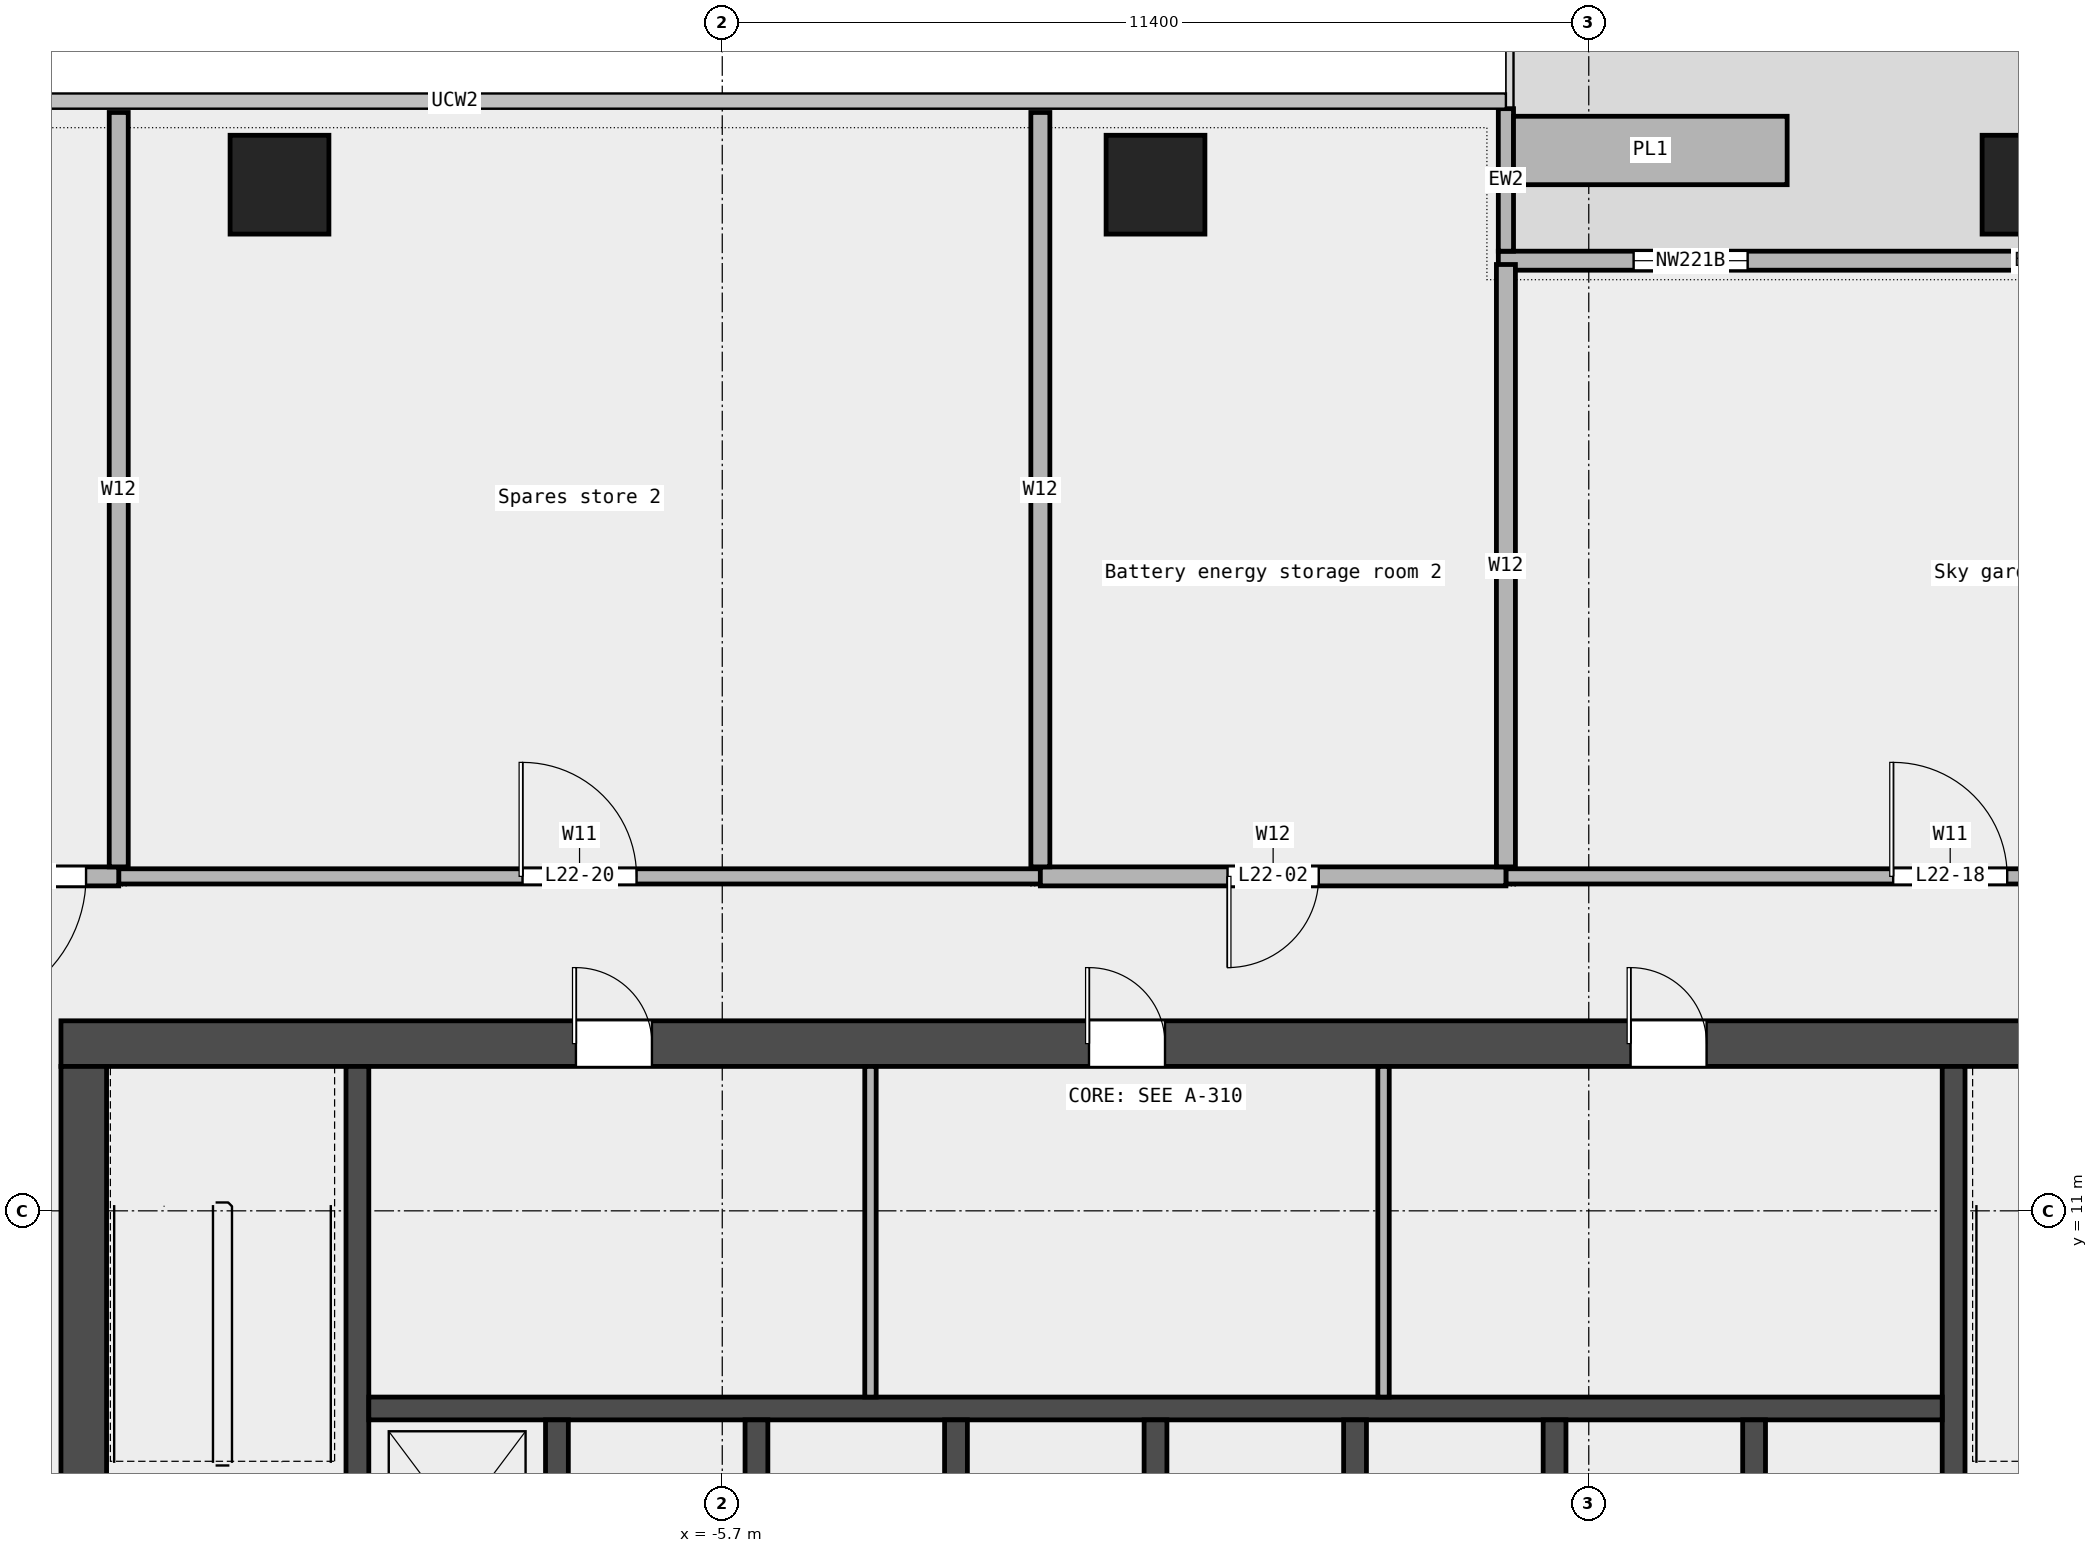
"""IFC4 building model, lengths in metres.
Left out: names, types, materials, properties, quantities, classifications, styles, units other than length and angle.
Written with IfcOpenShell. Run it as: python <this file> out.ifc"""

import sys

from ifc_helpers import new_model, si_unit, direction, frame, frame_2d, origin, origin_2d, place, context, subcontext, project, spatial, rectangle, extrude, element, fill, save


model = new_model("IFC4")
c1 = context("Model", 3, precision=1e-05, world=origin(), true_north=direction((0.0, 1.0)))
c2 = subcontext(c1, "Body", "Model", "MODEL_VIEW")
j1 = project(units=[si_unit("LENGTHUNIT", "METRE"), si_unit("PLANEANGLEUNIT", "RADIAN")], contexts=[c1])
p1 = place(None, origin())
s1 = spatial("IfcSite", under=j1, at=p1, CompositionType="ELEMENT")
p2 = place(p1, origin())
s2 = spatial("IfcBuilding", under=s1, at=p2, CompositionType="ELEMENT")
p3 = place(p2, frame((0.0, 0.0, 112.6)))
s3 = spatial("IfcBuildingStorey", under=s2, at=p3, CompositionType="ELEMENT", Elevation=112.6)
for number, where, z_axis, x_axis in (
    (1, (11.525, 24.5, 0.0), (0.0, 0.0, 1.0), (1.0, 0.0, 0.0)),
    (2, (0.0, 24.5, 0.0), (0.0, 0.0, 1.0), (1.0, 0.0, 0.0)),
    (3, (-11.525, 24.5, 0.0), (0.0, 0.0, 1.0), (1.0, 0.0, 0.0)),
):
    element("IfcColumn", number, at=place(p3, frame(where, z_axis=z_axis, x_axis=x_axis)), inside=s3, PredefinedType="COLUMN", context=c2, shape_type="SweptSolid", body=[
        extrude(rectangle(XDim=1.3, YDim=1.3, at=origin_2d()), origin(), (0.0, 0.0, 1.0), 4.05),
    ])
p4 = place(p3, frame((18.54, 23.5, 0.0), z_axis=(0.0, 0.0, 1.0), x_axis=(-1.0, 0.0, 0.0)))
e4 = element("IfcWall", 4, at=p4, inside=s3, PredefinedType="STANDARD", context=c2, shape_type="SweptSolid", body=[
    extrude(rectangle(XDim=14.03, YDim=0.25, at=frame_2d((7.015, 0.0))), origin(), (0.0, 0.0, 1.0), 4.05),
])
p5 = place(p4, frame((1.75, 0.0, 0.45)))
e5 = element("IfcOpeningElement", 5, at=p5, cuts=e4, PredefinedType="OPENING", context=c2, shape_type="SweptSolid", body=[
    extrude(rectangle(XDim=1.5, YDim=3.0, at=frame_2d((0.75, 1.5))), frame((0.0, 0.137, 0.0), z_axis=(0.0, -1.0, 0.0), x_axis=(1.0, 0.0, 0.0)), (0.0, 0.0, 1.0), 0.274),
])
p6 = place(p4, frame((4.25, 0.0, 0.0)))
e6 = element("IfcOpeningElement", 6, at=p6, cuts=e4, PredefinedType="OPENING", context=c2, shape_type="SweptSolid", body=[
    extrude(rectangle(XDim=1.8, YDim=2.4, at=frame_2d((0.9, 1.2))), frame((0.0, 0.137, 0.0), z_axis=(0.0, -1.0, 0.0), x_axis=(1.0, 0.0, 0.0)), (0.0, 0.0, 1.0), 0.274),
])
p7 = place(p4, frame((10.75, 0.0, 0.45)))
e7 = element("IfcOpeningElement", 7, at=p7, cuts=e4, PredefinedType="OPENING", context=c2, shape_type="SweptSolid", body=[
    extrude(rectangle(XDim=1.5, YDim=3.0, at=frame_2d((0.75, 1.5))), frame((0.0, 0.137, 0.0), z_axis=(0.0, -1.0, 0.0), x_axis=(1.0, 0.0, 0.0)), (0.0, 0.0, 1.0), 0.274),
])
p8 = place(p3, frame((4.61, 25.5, 0.0), z_axis=(0.0, 0.0, 1.0), x_axis=(0.0, -1.0, 0.0)))
e8 = element("IfcWall", 8, at=p8, inside=s3, PredefinedType="STANDARD", context=c2, shape_type="SweptSolid", body=[
    extrude(rectangle(XDim=1.875, YDim=0.2, at=frame_2d((0.938, 0.0))), origin(), (0.0, 0.0, 1.0), 4.05),
])
p9 = place(p3, frame((8.31, 24.95, 0.0), z_axis=(0.0, 0.0, 1.0), x_axis=(-1.0, 0.0, 0.0)))
e9 = element("IfcWall", 9, at=p9, inside=s3, PredefinedType="STANDARD", context=c2, shape_type="SweptSolid", body=[
    extrude(rectangle(XDim=3.6, YDim=0.9, at=frame_2d((1.8, 0.0))), origin(), (0.0, 0.0, 1.0), 0.7),
])
p10 = place(p3, frame((-13.64, 15.4, 0.0), z_axis=(0.0, 0.0, 1.0), x_axis=(1.0, 0.0, 0.0)))
e10 = element("IfcWall", 10, at=p10, inside=s3, PredefinedType="PARTITIONING", context=c2, shape_type="SweptSolid", body=[
    extrude(rectangle(XDim=12.125, YDim=0.2, at=frame_2d((6.062, 0.0))), origin(), (0.0, 0.0, 1.0), 4.05),
])
p11 = place(p10, frame((5.312, 0.0, 0.0)))
e11 = element("IfcOpeningElement", 11, at=p11, cuts=e10, PredefinedType="OPENING", context=c2, shape_type="SweptSolid", body=[
    extrude(rectangle(XDim=1.5, YDim=2.1, at=frame_2d((0.75, 1.05))), frame((0.0, 0.112, 0.0), z_axis=(0.0, -1.0, 0.0), x_axis=(1.0, 0.0, 0.0)), (0.0, 0.0, 1.0), 0.224),
])
p12 = place(p3, frame((4.61, 15.4, 0.0), z_axis=(0.0, 0.0, 1.0), x_axis=(1.0, 0.0, 0.0)))
e12 = element("IfcWall", 12, at=p12, inside=s3, PredefinedType="PARTITIONING", context=c2, shape_type="SweptSolid", body=[
    extrude(rectangle(XDim=11.69, YDim=0.2, at=frame_2d((5.845, 0.0))), origin(), (0.0, 0.0, 1.0), 4.05),
])
p13 = place(p12, frame((5.095, 0.0, 0.0)))
e13 = element("IfcOpeningElement", 13, at=p13, cuts=e12, PredefinedType="OPENING", context=c2, shape_type="SweptSolid", body=[
    extrude(rectangle(XDim=1.5, YDim=2.1, at=frame_2d((0.75, 1.05))), frame((0.0, 0.112, 0.0), z_axis=(0.0, -1.0, 0.0), x_axis=(1.0, 0.0, 0.0)), (0.0, 0.0, 1.0), 0.224),
])
p14 = place(p3, frame((-21.7, 15.4, 0.0), z_axis=(0.0, 0.0, 1.0), x_axis=(1.0, 0.0, 0.0)))
e14 = element("IfcWall", 14, at=p14, inside=s3, PredefinedType="PARTITIONING", context=c2, shape_type="SweptSolid", body=[
    extrude(rectangle(XDim=8.06, YDim=0.25, at=frame_2d((4.03, 0.0))), origin(), (0.0, 0.0, 1.0), 4.05),
])
p15 = place(p14, frame((5.83, 0.0, 0.0)))
e15 = element("IfcOpeningElement", 15, at=p15, cuts=e14, PredefinedType="OPENING", context=c2, shape_type="SweptSolid", body=[
    extrude(rectangle(XDim=1.8, YDim=2.1, at=frame_2d((0.9, 1.05))), frame((0.0, 0.137, 0.0), z_axis=(0.0, -1.0, 0.0), x_axis=(1.0, 0.0, 0.0)), (0.0, 0.0, 1.0), 0.274),
])
p16 = place(p3, frame((-1.515, 15.4, 0.0), z_axis=(0.0, 0.0, 1.0), x_axis=(1.0, 0.0, 0.0)))
e16 = element("IfcWall", 16, at=p16, inside=s3, PredefinedType="PARTITIONING", context=c2, shape_type="SweptSolid", body=[
    extrude(rectangle(XDim=6.125, YDim=0.25, at=frame_2d((3.062, 0.0))), origin(), (0.0, 0.0, 1.0), 4.05),
])
p17 = place(p16, frame((2.462, 0.0, 0.0)))
e17 = element("IfcOpeningElement", 17, at=p17, cuts=e16, PredefinedType="OPENING", context=c2, shape_type="SweptSolid", body=[
    extrude(rectangle(XDim=1.2, YDim=2.1, at=frame_2d((0.6, 1.05))), frame((0.0, 0.137, 0.0), z_axis=(0.0, -1.0, 0.0), x_axis=(1.0, 0.0, 0.0)), (0.0, 0.0, 1.0), 0.274),
])
for number, where, z_axis, x_axis in (
    (18, (-13.64, 15.525, 0.0), (0.0, 0.0, 1.0), (0.0, 1.0, 0.0)),
    (19, (-1.515, 15.525, 0.0), (0.0, 0.0, 1.0), (0.0, 1.0, 0.0)),
):
    element("IfcWall", number, at=place(p3, frame(where, z_axis=z_axis, x_axis=x_axis)), inside=s3, PredefinedType="PARTITIONING", context=c2, shape_type="SweptSolid", body=[
        extrude(rectangle(XDim=9.925, YDim=0.25, at=frame_2d((4.962, 0.0))), origin(), (0.0, 0.0, 1.0), 4.05),
    ])
p18 = place(p3, frame((4.61, 15.525, 0.0), z_axis=(0.0, 0.0, 1.0), x_axis=(0.0, 1.0, 0.0)))
e20 = element("IfcWall", 20, at=p18, inside=s3, PredefinedType="PARTITIONING", context=c2, shape_type="SweptSolid", body=[
    extrude(rectangle(XDim=7.925, YDim=0.25, at=frame_2d((3.962, 0.0))), origin(), (0.0, 0.0, 1.0), 4.05),
])
p19 = place(p3, frame((-14.4, 13.2, 0.0), z_axis=(0.0, 0.0, 1.0), x_axis=(1.0, 0.0, 0.0)))
e21 = element("IfcWall", 21, at=p19, inside=s3, PredefinedType="SHEAR", context=c2, shape_type="SweptSolid", body=[
    extrude(rectangle(XDim=28.8, YDim=0.6, at=frame_2d((14.4, 0.0))), origin(), (0.0, 0.0, 1.0), 4.2),
])
p20 = place(p19, frame((6.775, 0.0, 0.0)))
e22 = element("IfcOpeningElement", 22, at=p20, cuts=e21, PredefinedType="OPENING", context=c2, shape_type="SweptSolid", body=[
    extrude(rectangle(XDim=1.0, YDim=2.1, at=frame_2d((0.5, 1.05))), frame((0.0, 0.312, 0.0), z_axis=(0.0, -1.0, 0.0), x_axis=(1.0, 0.0, 0.0)), (0.0, 0.0, 1.0), 0.624),
])
p21 = place(p19, frame((13.525, 0.0, 0.0)))
e23 = element("IfcOpeningElement", 23, at=p21, cuts=e21, PredefinedType="OPENING", context=c2, shape_type="SweptSolid", body=[
    extrude(rectangle(XDim=1.0, YDim=2.1, at=frame_2d((0.5, 1.05))), frame((0.0, 0.312, 0.0), z_axis=(0.0, -1.0, 0.0), x_axis=(1.0, 0.0, 0.0)), (0.0, 0.0, 1.0), 0.624),
])
p22 = place(p19, frame((20.65, 0.0, 0.0)))
e24 = element("IfcOpeningElement", 24, at=p22, cuts=e21, PredefinedType="OPENING", context=c2, shape_type="SweptSolid", body=[
    extrude(rectangle(XDim=1.0, YDim=2.1, at=frame_2d((0.5, 1.05))), frame((0.0, 0.312, 0.0), z_axis=(0.0, -1.0, 0.0), x_axis=(1.0, 0.0, 0.0)), (0.0, 0.0, 1.0), 0.624),
])
p23 = place(p3, frame((-14.1, -6.6, 0.0), z_axis=(0.0, 0.0, 1.0), x_axis=(0.0, 1.0, 0.0)))
e25 = element("IfcWall", 25, at=p23, inside=s3, PredefinedType="SHEAR", context=c2, shape_type="SweptSolid", body=[
    extrude(rectangle(XDim=19.5, YDim=0.6, at=frame_2d((9.75, 0.0))), origin(), (0.0, 0.0, 1.0), 4.2),
])
p24 = place(p23, frame((9.3, 0.0, 0.0)))
e26 = element("IfcOpeningElement", 26, at=p24, cuts=e25, PredefinedType="OPENING", context=c2, shape_type="SweptSolid", body=[
    extrude(rectangle(XDim=1.8, YDim=2.1, at=frame_2d((0.9, 1.05))), frame((0.0, 0.312, 0.0), z_axis=(0.0, -1.0, 0.0), x_axis=(1.0, 0.0, 0.0)), (0.0, 0.0, 1.0), 0.624),
])
for number, where, z_axis, x_axis in (
    (27, (-10.5, 5.25, 0.0), (0.0, 0.0, 1.0), (0.0, 1.0, 0.0)),
    (28, (10.5, 5.25, 0.0), (0.0, 0.0, 1.0), (0.0, 1.0, 0.0)),
):
    element("IfcWall", number, at=place(p3, frame(where, z_axis=z_axis, x_axis=x_axis)), inside=s3, PredefinedType="SHEAR", context=c2, shape_type="SweptSolid", body=[
        extrude(rectangle(XDim=7.65, YDim=0.3, at=frame_2d((3.825, 0.0))), origin(), (0.0, 0.0, 1.0), 4.2),
    ])
p25 = place(p3, frame((-10.35, 8.4, 0.0), z_axis=(0.0, 0.0, 1.0), x_axis=(1.0, 0.0, 0.0)))
e29 = element("IfcWall", 29, at=p25, inside=s3, PredefinedType="SOLIDWALL", context=c2, shape_type="SweptSolid", body=[
    extrude(rectangle(XDim=20.7, YDim=0.3, at=frame_2d((10.35, 0.0))), origin(), (0.0, 0.0, 1.0), 4.2),
])
for number, where, z_axis, x_axis in (
    (30, (-7.875, 5.55, 0.0), (0.0, 0.0, 1.0), (0.0, 1.0, 0.0)),
    (31, (-5.25, 5.55, 0.0), (0.0, 0.0, 1.0), (0.0, 1.0, 0.0)),
    (32, (-2.625, 5.55, 0.0), (0.0, 0.0, 1.0), (0.0, 1.0, 0.0)),
    (33, (0.0, 5.55, 0.0), (0.0, 0.0, 1.0), (0.0, 1.0, 0.0)),
    (34, (2.625, 5.55, 0.0), (0.0, 0.0, 1.0), (0.0, 1.0, 0.0)),
    (35, (5.25, 5.55, 0.0), (0.0, 0.0, 1.0), (0.0, 1.0, 0.0)),
    (36, (7.875, 5.55, 0.0), (0.0, 0.0, 1.0), (0.0, 1.0, 0.0)),
):
    element("IfcWall", number, at=place(p3, frame(where, z_axis=z_axis, x_axis=x_axis)), inside=s3, PredefinedType="SOLIDWALL", context=c2, shape_type="SweptSolid", body=[
        extrude(rectangle(XDim=2.7, YDim=0.3, at=frame_2d((1.35, 0.0))), origin(), (0.0, 0.0, 1.0), 4.2),
    ])
for number, where, z_axis, x_axis in (
    (37, (-3.75, 8.55, 0.0), (0.0, 0.0, 1.0), (0.0, 1.0, 0.0)),
    (38, (3.0, 8.55, 0.0), (0.0, 0.0, 1.0), (0.0, 1.0, 0.0)),
):
    element("IfcWall", number, at=place(p3, frame(where, z_axis=z_axis, x_axis=x_axis)), inside=s3, PredefinedType="PARTITIONING", context=c2, shape_type="SweptSolid", body=[
        extrude(rectangle(XDim=4.35, YDim=0.15, at=frame_2d((2.175, 0.0))), origin(), (0.0, 0.0, 1.0), 4.2),
    ])
p26 = place(p7, origin())
e39 = element("IfcWindow", 39, at=p26, inside=s3, PartitioningType="SINGLE_PANEL", PredefinedType="WINDOW", context=c2, shape_type="SweptSolid", body=[
    extrude(rectangle(XDim=1.5, YDim=3.0, at=frame_2d((0.75, 1.5))), frame((0.0, 0.03, 0.0), z_axis=(0.0, -1.0, 0.0), x_axis=(1.0, 0.0, 0.0)), (0.0, 0.0, 1.0), 0.06),
])
fill(e7, e39)
p27 = place(p17, origin())
e40 = element("IfcDoor", 40, at=p27, inside=s3, OperationType="SINGLE_SWING_RIGHT", PredefinedType="DOOR", context=c2, shape_type="SweptSolid", body=[
    extrude(rectangle(XDim=1.2, YDim=2.1, at=frame_2d((0.6, 1.05))), frame((0.0, 0.025, 0.0), z_axis=(0.0, -1.0, 0.0), x_axis=(1.0, 0.0, 0.0)), (0.0, 0.0, 1.0), 0.05),
])
fill(e17, e40)
p28 = place(p15, origin())
e41 = element("IfcDoor", 41, at=p28, inside=s3, OperationType="DOUBLE_DOOR_SINGLE_SWING", PredefinedType="DOOR", context=c2, shape_type="SweptSolid", body=[
    extrude(rectangle(XDim=1.8, YDim=2.1, at=frame_2d((0.9, 1.05))), frame((0.0, 0.025, 0.0), z_axis=(0.0, -1.0, 0.0), x_axis=(1.0, 0.0, 0.0)), (0.0, 0.0, 1.0), 0.05),
])
fill(e15, e41)
p29 = place(p13, origin())
e42 = element("IfcDoor", 42, at=p29, inside=s3, OperationType="DOUBLE_DOOR_SINGLE_SWING", PredefinedType="DOOR", context=c2, shape_type="SweptSolid", body=[
    extrude(rectangle(XDim=1.5, YDim=2.1, at=frame_2d((0.75, 1.05))), frame((0.0, 0.025, 0.0), z_axis=(0.0, -1.0, 0.0), x_axis=(1.0, 0.0, 0.0)), (0.0, 0.0, 1.0), 0.05),
])
fill(e13, e42)
p30 = place(p11, origin())
e43 = element("IfcDoor", 43, at=p30, inside=s3, OperationType="DOUBLE_DOOR_SINGLE_SWING", PredefinedType="DOOR", context=c2, shape_type="SweptSolid", body=[
    extrude(rectangle(XDim=1.5, YDim=2.1, at=frame_2d((0.75, 1.05))), frame((0.0, 0.025, 0.0), z_axis=(0.0, -1.0, 0.0), x_axis=(1.0, 0.0, 0.0)), (0.0, 0.0, 1.0), 0.05),
])
fill(e11, e43)
p31 = place(p20, origin())
e44 = element("IfcDoor", 44, at=p31, inside=s3, OperationType="SINGLE_SWING_LEFT", PredefinedType="DOOR", context=c2, shape_type="SweptSolid", body=[
    extrude(rectangle(XDim=1.0, YDim=2.1, at=frame_2d((0.5, 1.05))), frame((0.0, 0.025, 0.0), z_axis=(0.0, -1.0, 0.0), x_axis=(1.0, 0.0, 0.0)), (0.0, 0.0, 1.0), 0.05),
])
fill(e22, e44)
p32 = place(p21, origin())
e45 = element("IfcDoor", 45, at=p32, inside=s3, OperationType="SINGLE_SWING_LEFT", PredefinedType="DOOR", context=c2, shape_type="SweptSolid", body=[
    extrude(rectangle(XDim=1.0, YDim=2.1, at=frame_2d((0.5, 1.05))), frame((0.0, 0.025, 0.0), z_axis=(0.0, -1.0, 0.0), x_axis=(1.0, 0.0, 0.0)), (0.0, 0.0, 1.0), 0.05),
])
fill(e23, e45)
p33 = place(p22, origin())
e46 = element("IfcDoor", 46, at=p33, inside=s3, OperationType="SINGLE_SWING_LEFT", PredefinedType="DOOR", context=c2, shape_type="SweptSolid", body=[
    extrude(rectangle(XDim=1.0, YDim=2.1, at=frame_2d((0.5, 1.05))), frame((0.0, 0.025, 0.0), z_axis=(0.0, -1.0, 0.0), x_axis=(1.0, 0.0, 0.0)), (0.0, 0.0, 1.0), 0.05),
])
fill(e24, e46)
save(model, sys.argv[1])
